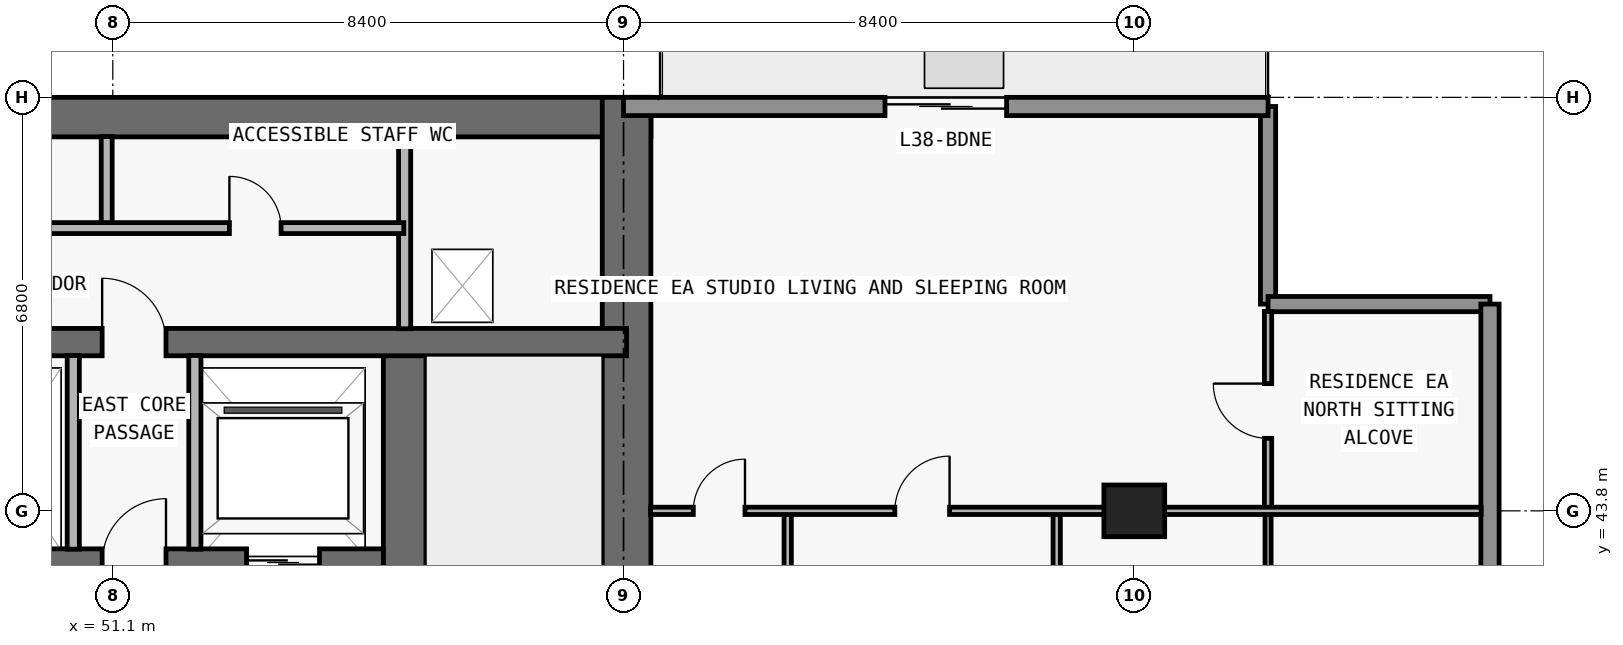
"""IFC4 building model, lengths in metres.
Left out: names, types, materials, properties, quantities, classifications, styles, units other than length and angle.
Written with IfcOpenShell. Run it as: python <this file> out.ifc"""

import sys

from ifc_helpers import new_model, si_unit, direction, frame, frame_2d, origin, origin_2d, place, context, subcontext, project, spatial, rectangle, extrude, element, fill, save


model = new_model("IFC4")
c1 = context("Model", 3, precision=1e-05, world=origin(), true_north=direction((0.0, 1.0)))
c2 = subcontext(c1, "Body", "Model", "MODEL_VIEW")
j1 = project(units=[si_unit("LENGTHUNIT", "METRE"), si_unit("PLANEANGLEUNIT", "RADIAN")], contexts=[c1])
p1 = place(None, origin())
s1 = spatial("IfcSite", under=j1, at=p1, CompositionType="ELEMENT")
p2 = place(p1, origin())
s2 = spatial("IfcBuilding", under=s1, at=p2, CompositionType="ELEMENT")
p3 = place(p2, frame((0.0, 0.0, 138.9)))
s3 = spatial("IfcBuildingStorey", under=s2, at=p3, CompositionType="ELEMENT", Elevation=138.9)
p4 = place(p3, frame((67.9, 43.8, 0.0), z_axis=(0.0, 0.0, 1.0), x_axis=(1.0, 0.0, 0.0)))
e1 = element("IfcColumn", 1, at=p4, inside=s3, PredefinedType="COLUMN", context=c2, shape_type="SweptSolid", body=[
    extrude(rectangle(XDim=1.0, YDim=0.85, at=origin_2d()), origin(), (0.0, 0.0, 1.0), 3.05),
])
p5 = place(p3, frame((17.85, 50.275, 0.0), z_axis=(0.0, 0.0, 1.0), x_axis=(1.0, 0.0, 0.0)))
e2 = element("IfcWall", 2, at=p5, inside=s3, PredefinedType="SHEAR", context=c2, shape_type="SweptSolid", body=[
    extrude(rectangle(XDim=42.1, YDim=0.65, at=frame_2d((21.05, 0.0))), origin(), (0.0, 0.0, 1.0), 3.05),
])
p6 = place(p3, frame((59.55, 36.55, 0.0), z_axis=(0.0, 0.0, 1.0), x_axis=(0.0, 1.0, 0.0)))
e3 = element("IfcWall", 3, at=p6, inside=s3, PredefinedType="SHEAR", context=c2, shape_type="SweptSolid", body=[
    extrude(rectangle(XDim=14.05, YDim=0.8, at=frame_2d((7.025, 0.0))), origin(), (0.0, 0.0, 1.0), 3.05),
])
p7 = place(p3, frame((55.9, 36.95, 0.0), z_axis=(0.0, 0.0, 1.0), x_axis=(0.0, 1.0, 0.0)))
e4 = element("IfcWall", 4, at=p7, inside=s3, PredefinedType="SHEAR", context=c2, shape_type="SweptSolid", body=[
    extrude(rectangle(XDim=9.625, YDim=0.7, at=frame_2d((4.812, 0.0))), origin(), (0.0, 0.0, 1.0), 3.05),
])
p8 = place(p7, frame((0.6, 0.0, 0.0)))
e5 = element("IfcOpeningElement", 5, at=p8, cuts=e4, PredefinedType="OPENING", context=c2, shape_type="SweptSolid", body=[
    extrude(rectangle(XDim=1.1, YDim=2.15, at=frame_2d((0.55, 1.075))), frame((0.0, 0.36, 0.0), z_axis=(0.0, -1.0, 0.0), x_axis=(1.0, 0.0, 0.0)), (0.0, 0.0, 1.0), 0.72),
])
p9 = place(p3, frame((22.25, 42.95, 0.0), z_axis=(0.0, 0.0, 1.0), x_axis=(1.0, 0.0, 0.0)))
e6 = element("IfcWall", 6, at=p9, inside=s3, PredefinedType="SHEAR", context=c2, shape_type="SweptSolid", body=[
    extrude(rectangle(XDim=33.3, YDim=0.45, at=frame_2d((16.65, 0.0))), origin(), (0.0, 0.0, 1.0), 3.05),
])
p10 = place(p9, frame((1.05, 0.0, 0.0)))
e7 = element("IfcOpeningElement", 7, at=p10, cuts=e6, PredefinedType="OPENING", context=c2, shape_type="SweptSolid", body=[
    extrude(rectangle(XDim=1.2, YDim=2.2, at=frame_2d((0.6, 1.1))), frame((0.0, 0.235, 0.0), z_axis=(0.0, -1.0, 0.0), x_axis=(1.0, 0.0, 0.0)), (0.0, 0.0, 1.0), 0.47),
])
p11 = place(p9, frame((31.05, 0.0, 0.0)))
e8 = element("IfcOpeningElement", 8, at=p11, cuts=e6, PredefinedType="OPENING", context=c2, shape_type="SweptSolid", body=[
    extrude(rectangle(XDim=1.2, YDim=2.2, at=frame_2d((0.6, 1.1))), frame((0.0, 0.235, 0.0), z_axis=(0.0, -1.0, 0.0), x_axis=(1.0, 0.0, 0.0)), (0.0, 0.0, 1.0), 0.47),
])
p12 = place(p9, frame((21.4, 0.0, 0.0)))
e9 = element("IfcOpeningElement", 9, at=p12, cuts=e6, PredefinedType="OPENING", context=c2, shape_type="SweptSolid", body=[
    extrude(rectangle(XDim=1.1, YDim=2.2, at=frame_2d((0.55, 1.1))), frame((0.0, 0.235, 0.0), z_axis=(0.0, -1.0, 0.0), x_axis=(1.0, 0.0, 0.0)), (0.0, 0.0, 1.0), 0.47),
])
p13 = place(p9, frame((24.0, 0.0, 0.0)))
e10 = element("IfcOpeningElement", 10, at=p13, cuts=e6, PredefinedType="OPENING", context=c2, shape_type="SweptSolid", body=[
    extrude(rectangle(XDim=1.1, YDim=2.2, at=frame_2d((0.55, 1.1))), frame((0.0, 0.235, 0.0), z_axis=(0.0, -1.0, 0.0), x_axis=(1.0, 0.0, 0.0)), (0.0, 0.0, 1.0), 0.47),
])
p14 = place(p9, frame((3.625, 0.0, 0.0)))
e11 = element("IfcOpeningElement", 11, at=p14, cuts=e6, PredefinedType="OPENING", context=c2, shape_type="SweptSolid", body=[
    extrude(rectangle(XDim=1.05, YDim=2.15, at=frame_2d((0.525, 1.075))), frame((0.0, 0.235, 0.0), z_axis=(0.0, -1.0, 0.0), x_axis=(1.0, 0.0, 0.0)), (0.0, 0.0, 1.0), 0.47),
])
p15 = place(p9, frame((28.675, 0.0, 0.0)))
e12 = element("IfcOpeningElement", 12, at=p15, cuts=e6, PredefinedType="OPENING", context=c2, shape_type="SweptSolid", body=[
    extrude(rectangle(XDim=1.05, YDim=2.15, at=frame_2d((0.525, 1.075))), frame((0.0, 0.235, 0.0), z_axis=(0.0, -1.0, 0.0), x_axis=(1.0, 0.0, 0.0)), (0.0, 0.0, 1.0), 0.47),
])
p16 = place(p9, frame((15.975, 0.0, 0.0)))
e13 = element("IfcOpeningElement", 13, at=p16, cuts=e6, PredefinedType="OPENING", context=c2, shape_type="SweptSolid", body=[
    extrude(rectangle(XDim=1.0, YDim=2.2, at=frame_2d((0.5, 1.1))), frame((0.0, 0.235, 0.0), z_axis=(0.0, -1.0, 0.0), x_axis=(1.0, 0.0, 0.0)), (0.0, 0.0, 1.0), 0.47),
])
p17 = place(p3, frame((18.25, 46.575, 0.0), z_axis=(0.0, 0.0, 1.0), x_axis=(1.0, 0.0, 0.0)))
e14 = element("IfcWall", 14, at=p17, inside=s3, PredefinedType="SHEAR", context=c2, shape_type="SweptSolid", body=[
    extrude(rectangle(XDim=41.3, YDim=0.45, at=frame_2d((20.65, 0.0))), origin(), (0.0, 0.0, 1.0), 3.05),
])
p18 = place(p17, frame((7.65, 0.0, 0.0)))
e15 = element("IfcOpeningElement", 15, at=p18, cuts=e14, PredefinedType="OPENING", context=c2, shape_type="SweptSolid", body=[
    extrude(rectangle(XDim=1.0, YDim=2.2, at=frame_2d((0.5, 1.1))), frame((0.0, 0.235, 0.0), z_axis=(0.0, -1.0, 0.0), x_axis=(1.0, 0.0, 0.0)), (0.0, 0.0, 1.0), 0.47),
])
p19 = place(p17, frame((32.675, 0.0, 0.0)))
e16 = element("IfcOpeningElement", 16, at=p19, cuts=e14, PredefinedType="OPENING", context=c2, shape_type="SweptSolid", body=[
    extrude(rectangle(XDim=1.05, YDim=2.15, at=frame_2d((0.525, 1.075))), frame((0.0, 0.235, 0.0), z_axis=(0.0, -1.0, 0.0), x_axis=(1.0, 0.0, 0.0)), (0.0, 0.0, 1.0), 0.47),
])
p20 = place(p3, frame((70.1, 50.45, 0.0), z_axis=(0.0, 0.0, 1.0), x_axis=(0.0, -1.0, 0.0)))
e17 = element("IfcWall", 17, at=p20, inside=s3, PredefinedType="ELEMENTEDWALL", context=c2, shape_type="SweptSolid", body=[
    extrude(rectangle(XDim=3.25, YDim=0.25, at=frame_2d((1.625, 0.0))), origin(), (0.0, 0.0, 1.0), 3.05),
])
p21 = place(p3, frame((70.1, 47.2, 0.0), z_axis=(0.0, 0.0, 1.0), x_axis=(1.0, 0.0, 0.0)))
e18 = element("IfcWall", 18, at=p21, inside=s3, PredefinedType="ELEMENTEDWALL", context=c2, shape_type="SweptSolid", body=[
    extrude(rectangle(XDim=3.65, YDim=0.25, at=frame_2d((1.825, 0.0))), origin(), (0.0, 0.0, 1.0), 3.05),
])
p22 = place(p3, frame((73.75, 47.2, 0.0), z_axis=(0.0, 0.0, 1.0), x_axis=(0.0, -1.0, 0.0)))
e19 = element("IfcWall", 19, at=p22, inside=s3, PredefinedType="STANDARD", context=c2, shape_type="SweptSolid", body=[
    extrude(rectangle(XDim=19.2, YDim=0.3, at=frame_2d((9.6, 0.0))), origin(), (0.0, 0.0, 1.0), 3.05),
])
p23 = place(p3, frame((59.5, 50.45, 0.0), z_axis=(0.0, 0.0, 1.0), x_axis=(1.0, 0.0, 0.0)))
e20 = element("IfcWall", 20, at=p23, inside=s3, PredefinedType="STANDARD", context=c2, shape_type="SweptSolid", body=[
    extrude(rectangle(XDim=10.6, YDim=0.3, at=frame_2d((5.3, 0.0))), origin(), (0.0, 0.0, 1.0), 3.05),
])
p24 = place(p23, frame((4.3, 0.0, 0.0)))
e21 = element("IfcOpeningElement", 21, at=p24, cuts=e20, PredefinedType="OPENING", context=c2, shape_type="SweptSolid", body=[
    extrude(rectangle(XDim=2.0, YDim=2.3, at=frame_2d((1.0, 1.15))), frame((0.0, 0.16, 0.0), z_axis=(0.0, -1.0, 0.0), x_axis=(1.0, 0.0, 0.0)), (0.0, 0.0, 1.0), 0.32),
])
p25 = place(p3, frame((50.45, 43.17, 0.0), z_axis=(0.0, 0.0, 1.0), x_axis=(0.0, 1.0, 0.0)))
e22 = element("IfcWall", 22, at=p25, inside=s3, PredefinedType="PARTITIONING", context=c2, shape_type="SweptSolid", body=[
    extrude(rectangle(XDim=3.185, YDim=0.2, at=frame_2d((1.593, 0.0))), origin(), (0.0, 0.0, 1.0), 3.05),
])
p26 = place(p3, frame((51.0, 48.45, 0.0), z_axis=(0.0, 0.0, 1.0), x_axis=(0.0, 1.0, 0.0)))
e23 = element("IfcWall", 23, at=p26, inside=s3, PredefinedType="PARTITIONING", context=c2, shape_type="SweptSolid", body=[
    extrude(rectangle(XDim=1.505, YDim=0.18, at=frame_2d((0.752, 0.0))), origin(), (0.0, 0.0, 1.0), 3.05),
])
p27 = place(p3, frame((52.45, 43.17, 0.0), z_axis=(0.0, 0.0, 1.0), x_axis=(0.0, 1.0, 0.0)))
e24 = element("IfcWall", 24, at=p27, inside=s3, PredefinedType="PARTITIONING", context=c2, shape_type="SweptSolid", body=[
    extrude(rectangle(XDim=3.185, YDim=0.2, at=frame_2d((1.593, 0.0))), origin(), (0.0, 0.0, 1.0), 3.05),
])
p28 = place(p3, frame((55.9, 46.795, 0.0), z_axis=(0.0, 0.0, 1.0), x_axis=(0.0, 1.0, 0.0)))
e25 = element("IfcWall", 25, at=p28, inside=s3, PredefinedType="PARTITIONING", context=c2, shape_type="SweptSolid", body=[
    extrude(rectangle(XDim=3.16, YDim=0.2, at=frame_2d((1.58, 0.0))), origin(), (0.0, 0.0, 1.0), 3.05),
])
p29 = place(p3, frame((62.2, 36.95, 0.0), z_axis=(0.0, 0.0, 1.0), x_axis=(0.0, 1.0, 0.0)))
e26 = element("IfcWall", 26, at=p29, inside=s3, PredefinedType="PARTITIONING", context=c2, shape_type="SweptSolid", body=[
    extrude(rectangle(XDim=6.85, YDim=0.12, at=frame_2d((3.425, 0.0))), origin(), (0.0, 0.0, 1.0), 3.05),
])
p30 = place(p29, frame((1.219, 0.0, 0.0)))
e27 = element("IfcOpeningElement", 27, at=p30, cuts=e26, PredefinedType="OPENING", context=c2, shape_type="SweptSolid", body=[
    extrude(rectangle(XDim=0.85, YDim=2.1, at=frame_2d((0.425, 1.05))), frame((0.0, 0.07, 0.0), z_axis=(0.0, -1.0, 0.0), x_axis=(1.0, 0.0, 0.0)), (0.0, 0.0, 1.0), 0.14),
])
p31 = place(p3, frame((66.624, 36.95, 0.0), z_axis=(0.0, 0.0, 1.0), x_axis=(0.0, 1.0, 0.0)))
e28 = element("IfcWall", 28, at=p31, inside=s3, PredefinedType="PARTITIONING", context=c2, shape_type="SweptSolid", body=[
    extrude(rectangle(XDim=6.85, YDim=0.12, at=frame_2d((3.425, 0.0))), origin(), (0.0, 0.0, 1.0), 3.05),
])
p32 = place(p31, frame((2.975, 0.0, 0.0)))
e29 = element("IfcOpeningElement", 29, at=p32, cuts=e28, PredefinedType="OPENING", context=c2, shape_type="SweptSolid", body=[
    extrude(rectangle(XDim=0.9, YDim=2.15, at=frame_2d((0.45, 1.075))), frame((0.0, 0.07, 0.0), z_axis=(0.0, -1.0, 0.0), x_axis=(1.0, 0.0, 0.0)), (0.0, 0.0, 1.0), 0.14),
])
p33 = place(p3, frame((70.1, 36.955, 0.0), z_axis=(0.0, 0.0, 1.0), x_axis=(0.0, 1.0, 0.0)))
e30 = element("IfcWall", 30, at=p33, inside=s3, PredefinedType="MOVABLE", context=c2, shape_type="SweptSolid", body=[
    extrude(rectangle(XDim=6.845, YDim=0.1, at=frame_2d((3.422, 0.0))), origin(), (0.0, 0.0, 1.0), 3.05),
])
p34 = place(p33, frame((2.972, 0.0, 0.0)))
e31 = element("IfcOpeningElement", 31, at=p34, cuts=e30, PredefinedType="OPENING", context=c2, shape_type="SweptSolid", body=[
    extrude(rectangle(XDim=0.9, YDim=2.15, at=frame_2d((0.45, 1.075))), frame((0.0, 0.06, 0.0), z_axis=(0.0, -1.0, 0.0), x_axis=(1.0, 0.0, 0.0)), (0.0, 0.0, 1.0), 0.12),
])
p35 = place(p3, frame((70.1, 43.805, 0.0), z_axis=(0.0, 0.0, 1.0), x_axis=(0.0, 1.0, 0.0)))
e32 = element("IfcWall", 32, at=p35, inside=s3, PredefinedType="PARTITIONING", context=c2, shape_type="SweptSolid", body=[
    extrude(rectangle(XDim=3.275, YDim=0.12, at=frame_2d((1.638, 0.0))), origin(), (0.0, 0.0, 1.0), 3.05),
])
p36 = place(p35, frame((1.188, 0.0, 0.0)))
e33 = element("IfcOpeningElement", 33, at=p36, cuts=e32, PredefinedType="OPENING", context=c2, shape_type="SweptSolid", body=[
    extrude(rectangle(XDim=0.9, YDim=2.15, at=frame_2d((0.45, 1.075))), frame((0.0, 0.07, 0.0), z_axis=(0.0, -1.0, 0.0), x_axis=(1.0, 0.0, 0.0)), (0.0, 0.0, 1.0), 0.14),
])
p37 = place(p3, frame((59.945, 43.8, 0.0), z_axis=(0.0, 0.0, 1.0), x_axis=(1.0, 0.0, 0.0)))
e34 = element("IfcWall", 34, at=p37, inside=s3, PredefinedType="PARTITIONING", context=c2, shape_type="SweptSolid", body=[
    extrude(rectangle(XDim=13.66, YDim=0.12, at=frame_2d((6.83, 0.0))), origin(), (0.0, 0.0, 1.0), 2.339),
])
p38 = place(p37, frame((4.017, 0.0, 0.0)))
e35 = element("IfcOpeningElement", 35, at=p38, cuts=e34, PredefinedType="OPENING", context=c2, shape_type="SweptSolid", body=[
    extrude(rectangle(XDim=0.9, YDim=2.15, at=frame_2d((0.45, 1.075))), frame((0.0, 0.07, 0.0), z_axis=(0.0, -1.0, 0.0), x_axis=(1.0, 0.0, 0.0)), (0.0, 0.0, 1.0), 0.14),
])
p39 = place(p37, frame((0.702, 0.0, 0.0)))
e36 = element("IfcOpeningElement", 36, at=p39, cuts=e34, PredefinedType="OPENING", context=c2, shape_type="SweptSolid", body=[
    extrude(rectangle(XDim=0.85, YDim=2.1, at=frame_2d((0.425, 1.05))), frame((0.0, 0.07, 0.0), z_axis=(0.0, -1.0, 0.0), x_axis=(1.0, 0.0, 0.0)), (0.0, 0.0, 1.0), 0.14),
])
p40 = place(p3, frame((41.2, 48.45, 0.0), z_axis=(0.0, 0.0, 1.0), x_axis=(1.0, 0.0, 0.0)))
e37 = element("IfcWall", 37, at=p40, inside=s3, PredefinedType="PARTITIONING", context=c2, shape_type="SweptSolid", body=[
    extrude(rectangle(XDim=14.686, YDim=0.18, at=frame_2d((7.343, 0.0))), origin(), (0.0, 0.0, 1.0), 3.05),
])
p41 = place(p40, frame((1.85, 0.0, 0.0)))
e38 = element("IfcOpeningElement", 38, at=p41, cuts=e37, PredefinedType="OPENING", context=c2, shape_type="SweptSolid", body=[
    extrude(rectangle(XDim=1.2, YDim=2.2, at=frame_2d((0.6, 1.1))), frame((0.0, 0.1, 0.0), z_axis=(0.0, -1.0, 0.0), x_axis=(1.0, 0.0, 0.0)), (0.0, 0.0, 1.0), 0.2),
])
p42 = place(p40, frame((6.75, 0.0, 0.0)))
e39 = element("IfcOpeningElement", 39, at=p42, cuts=e37, PredefinedType="OPENING", context=c2, shape_type="SweptSolid", body=[
    extrude(rectangle(XDim=1.2, YDim=2.2, at=frame_2d((0.6, 1.1))), frame((0.0, 0.1, 0.0), z_axis=(0.0, -1.0, 0.0), x_axis=(1.0, 0.0, 0.0)), (0.0, 0.0, 1.0), 0.2),
])
p43 = place(p40, frame((11.818, 0.0, 0.0)))
e40 = element("IfcOpeningElement", 40, at=p43, cuts=e37, PredefinedType="OPENING", context=c2, shape_type="SweptSolid", body=[
    extrude(rectangle(XDim=0.85, YDim=2.1, at=frame_2d((0.425, 1.05))), frame((0.0, 0.1, 0.0), z_axis=(0.0, -1.0, 0.0), x_axis=(1.0, 0.0, 0.0)), (0.0, 0.0, 1.0), 0.2),
])
p44 = place(p24, origin())
e41 = element("IfcDoor", 41, at=p44, inside=s3, OperationType="DOUBLE_DOOR_SLIDING", PredefinedType="DOOR", context=c2, shape_type="SweptSolid", body=[
    extrude(rectangle(XDim=2.0, YDim=2.3, at=frame_2d((1.0, 1.15))), frame((0.0, 0.025, 0.0), z_axis=(0.0, -1.0, 0.0), x_axis=(1.0, 0.0, 0.0)), (0.0, 0.0, 1.0), 0.05),
])
fill(e21, e41)
p45 = place(p11, origin())
e42 = element("IfcDoor", 42, at=p45, inside=s3, OperationType="DOUBLE_DOOR_SLIDING", PredefinedType="DOOR", context=c2, shape_type="SweptSolid", body=[
    extrude(rectangle(XDim=1.2, YDim=2.2, at=frame_2d((0.6, 1.1))), frame((0.0, 0.025, 0.0), z_axis=(0.0, -1.0, 0.0), x_axis=(1.0, 0.0, 0.0)), (0.0, 0.0, 1.0), 0.05),
])
fill(e8, e42)
p46 = place(p15, origin())
e43 = element("IfcDoor", 43, at=p46, inside=s3, OperationType="SINGLE_SWING_RIGHT", PredefinedType="DOOR", context=c2, shape_type="SweptSolid", body=[
    extrude(rectangle(XDim=1.05, YDim=2.15, at=frame_2d((0.525, 1.075))), frame((0.0, 0.025, 0.0), z_axis=(0.0, -1.0, 0.0), x_axis=(1.0, 0.0, 0.0)), (0.0, 0.0, 1.0), 0.05),
])
fill(e12, e43)
p47 = place(p19, origin())
e44 = element("IfcDoor", 44, at=p47, inside=s3, OperationType="SINGLE_SWING_LEFT", PredefinedType="DOOR", context=c2, shape_type="SweptSolid", body=[
    extrude(rectangle(XDim=1.05, YDim=2.15, at=frame_2d((0.525, 1.075))), frame((0.0, 0.025, 0.0), z_axis=(0.0, -1.0, 0.0), x_axis=(1.0, 0.0, 0.0)), (0.0, 0.0, 1.0), 0.05),
])
fill(e16, e44)
p48 = place(p43, origin())
e45 = element("IfcDoor", 45, at=p48, inside=s3, OperationType="SINGLE_SWING_LEFT", PredefinedType="DOOR", context=c2, shape_type="SweptSolid", body=[
    extrude(rectangle(XDim=0.85, YDim=2.1, at=frame_2d((0.425, 1.05))), frame((0.0, 0.025, 0.0), z_axis=(0.0, -1.0, 0.0), x_axis=(1.0, 0.0, 0.0)), (0.0, 0.0, 1.0), 0.05),
])
fill(e40, e45)
p49 = place(p38, origin())
e46 = element("IfcDoor", 46, at=p49, inside=s3, OperationType="SINGLE_SWING_RIGHT", PredefinedType="DOOR", context=c2, shape_type="SweptSolid", body=[
    extrude(rectangle(XDim=0.9, YDim=2.15, at=frame_2d((0.45, 1.075))), frame((0.0, 0.025, 0.0), z_axis=(0.0, -1.0, 0.0), x_axis=(1.0, 0.0, 0.0)), (0.0, 0.0, 1.0), 0.05),
])
fill(e35, e46)
p50 = place(p39, origin())
e47 = element("IfcDoor", 47, at=p50, inside=s3, OperationType="SINGLE_SWING_RIGHT", PredefinedType="DOOR", context=c2, shape_type="SweptSolid", body=[
    extrude(rectangle(XDim=0.85, YDim=2.1, at=frame_2d((0.425, 1.05))), frame((0.0, 0.025, 0.0), z_axis=(0.0, -1.0, 0.0), x_axis=(1.0, 0.0, 0.0)), (0.0, 0.0, 1.0), 0.05),
])
fill(e36, e47)
p51 = place(p36, origin())
e48 = element("IfcDoor", 48, at=p51, inside=s3, OperationType="SINGLE_SWING_RIGHT", PredefinedType="DOOR", context=c2, shape_type="SweptSolid", body=[
    extrude(rectangle(XDim=0.9, YDim=2.15, at=frame_2d((0.45, 1.075))), frame((0.0, 0.025, 0.0), z_axis=(0.0, -1.0, 0.0), x_axis=(1.0, 0.0, 0.0)), (0.0, 0.0, 1.0), 0.05),
])
fill(e33, e48)
save(model, sys.argv[1])
